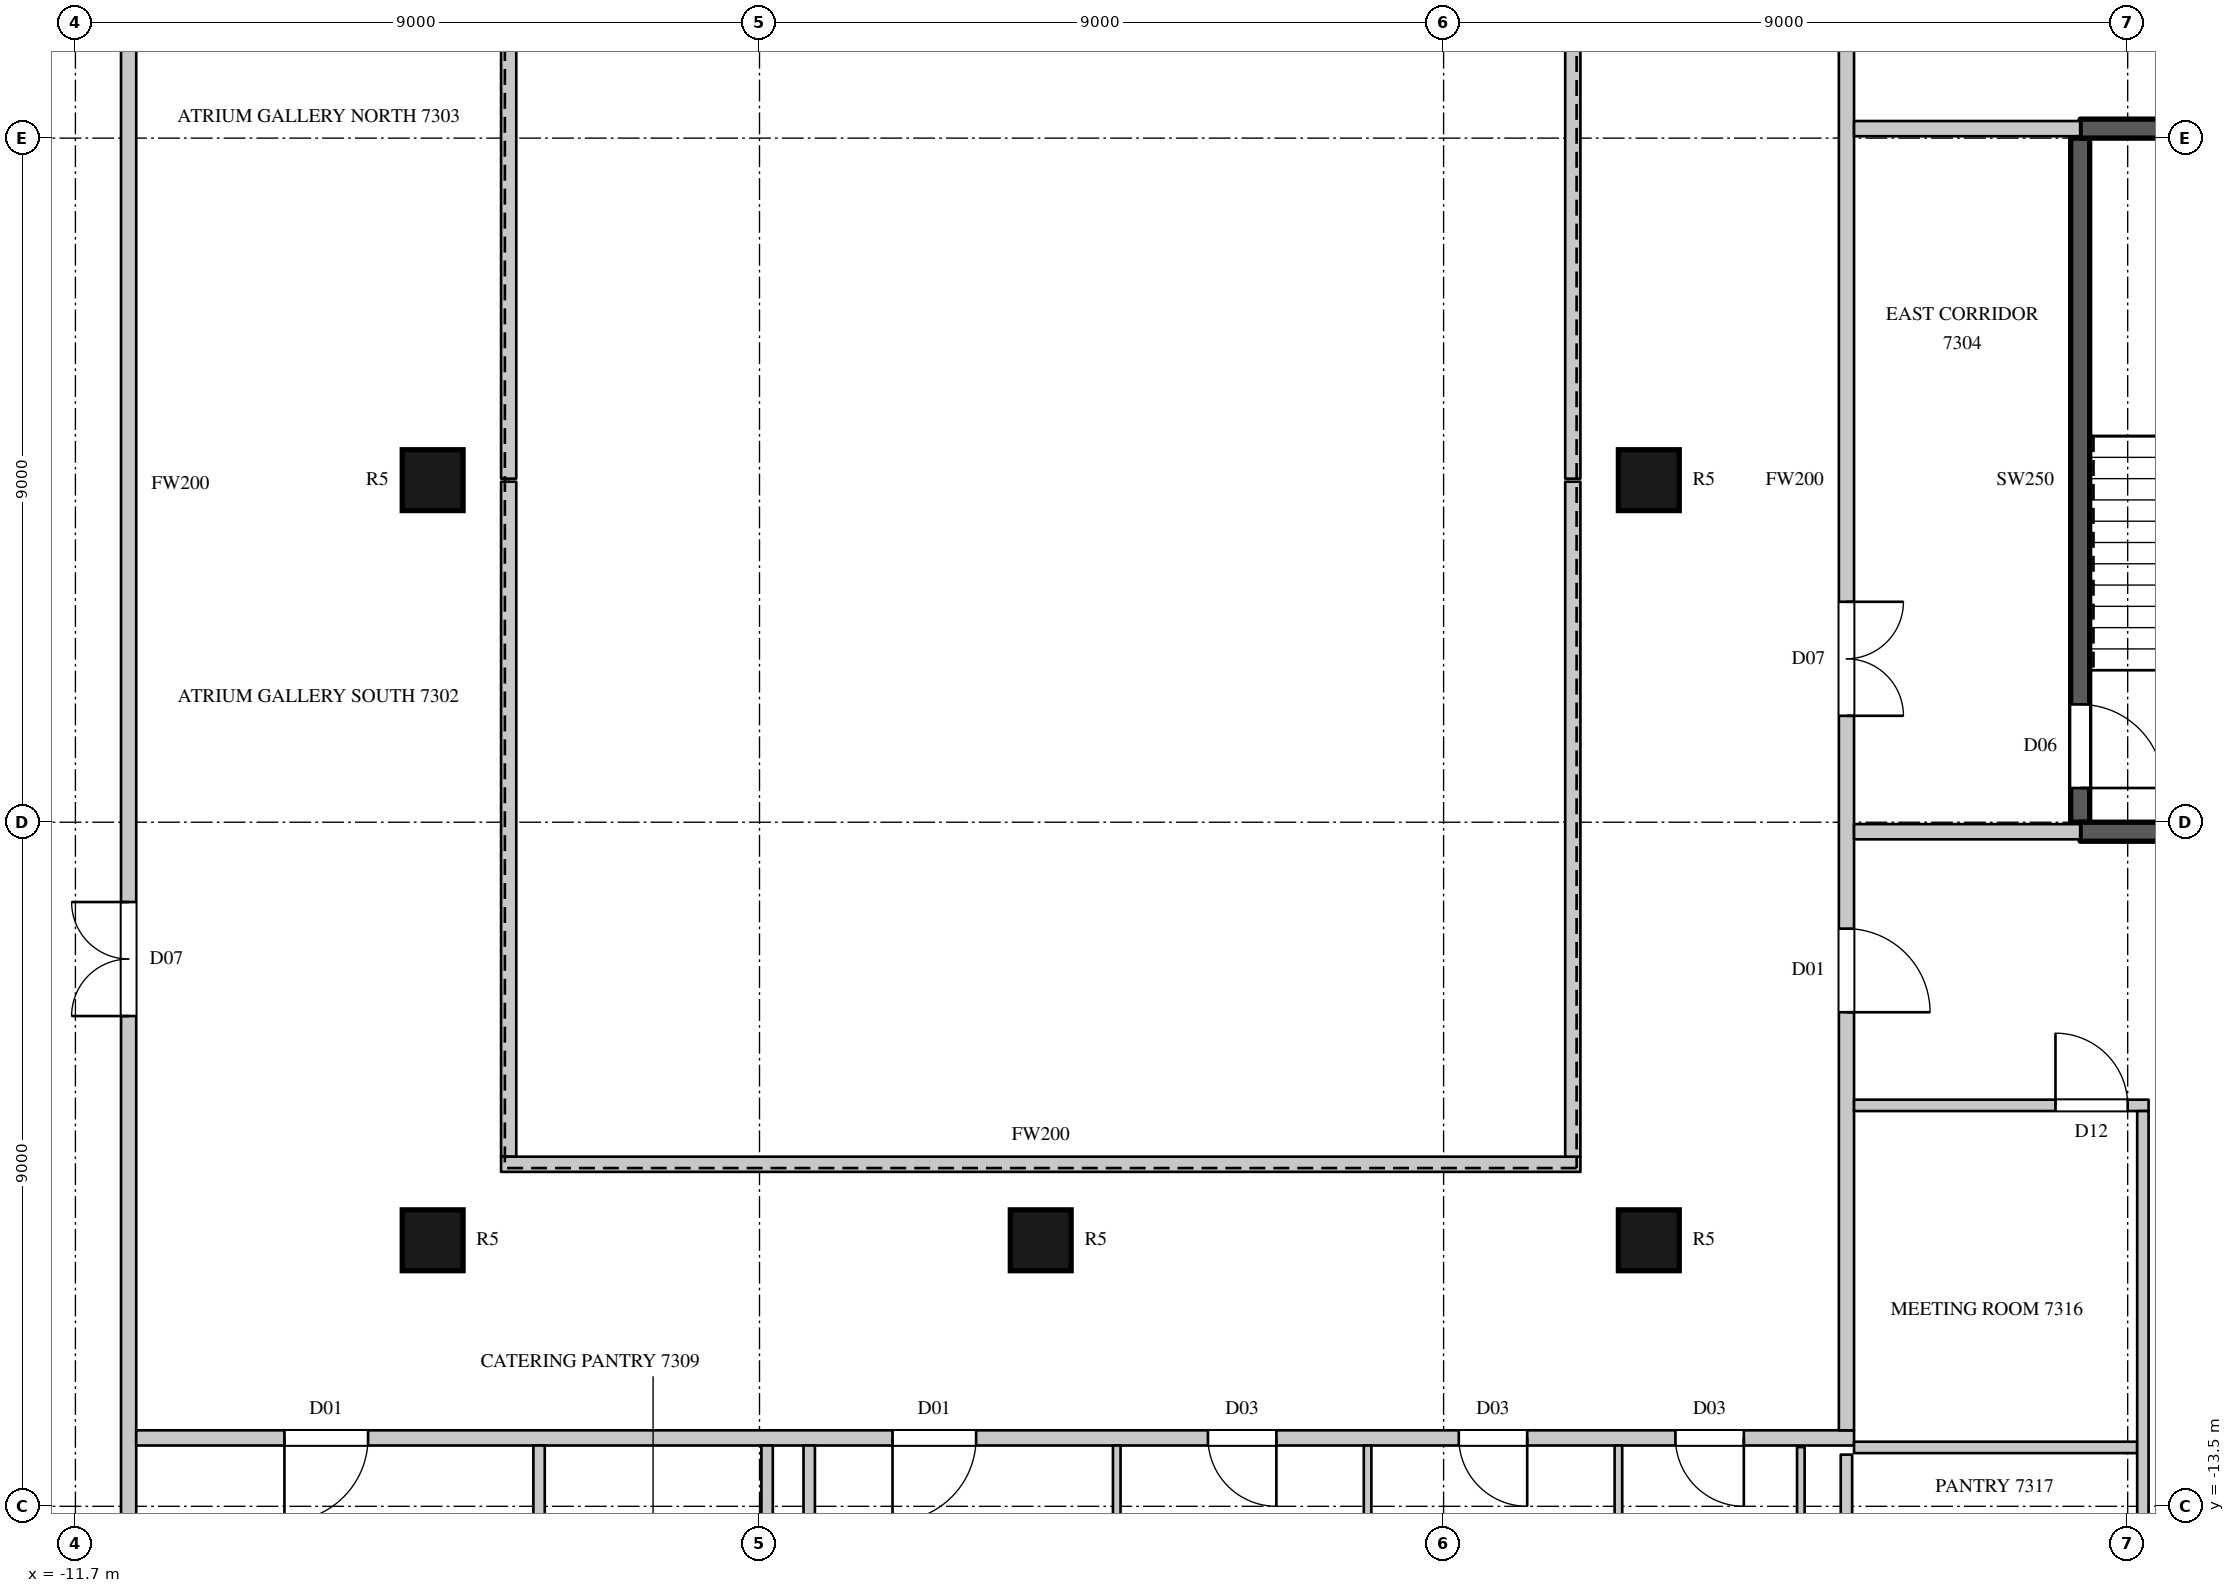
"""IFC4 building model, lengths in metres.
Left out: names, types, materials, properties, quantities, classifications, styles, units other than length and angle.
Written with IfcOpenShell. Run it as: python <this file> out.ifc"""

import sys

from ifc_helpers import new_model, si_unit, direction, frame, frame_2d, origin, origin_2d, place, context, subcontext, project, spatial, rectangle, circle, extrude, element, fill, save


model = new_model("IFC4")
c1 = context("Model", 3, precision=1e-05, world=origin(), true_north=direction((0.0, 1.0)))
c2 = subcontext(c1, "Body", "Model", "MODEL_VIEW")
j1 = project(units=[si_unit("LENGTHUNIT", "METRE"), si_unit("PLANEANGLEUNIT", "RADIAN")], contexts=[c1])
p1 = place(None, origin())
s1 = spatial("IfcSite", under=j1, at=p1, CompositionType="ELEMENT")
p2 = place(p1, origin())
s2 = spatial("IfcBuilding", under=s1, at=p2, CompositionType="ELEMENT")
p3 = place(p2, frame((0.0, 0.0, 321.3)))
s3 = spatial("IfcBuildingStorey", under=s2, at=p3, CompositionType="ELEMENT", Elevation=321.3)
for number, where, z_axis, x_axis in (
    (1, (-7.0, -10.0, 0.0), (0.0, 0.0, 1.0), (1.0, 0.0, 0.0)),
    (2, (-7.0, 0.0, 0.0), (0.0, 0.0, 1.0), (1.0, 0.0, 0.0)),
    (3, (1.0, -10.0, 0.0), (0.0, 0.0, 1.0), (1.0, 0.0, 0.0)),
    (4, (9.0, -10.0, 0.0), (0.0, 0.0, 1.0), (1.0, 0.0, 0.0)),
    (5, (9.0, 0.0, 0.0), (0.0, 0.0, 1.0), (1.0, 0.0, 0.0)),
):
    element("IfcColumn", number, at=place(p3, frame(where, z_axis=z_axis, x_axis=x_axis)), inside=s3, PredefinedType="COLUMN", context=c2, shape_type="SweptSolid", body=[
        extrude(circle(Radius=0.4, at=origin_2d()), origin(), (0.0, 0.0, 1.0), 4.1),
    ])
p4 = place(p3, frame((-11.0, -14.8, 0.0), z_axis=(0.0, 0.0, 1.0), x_axis=(0.0, 1.0, 0.0)))
e6 = element("IfcWall", 6, at=p4, inside=s3, PredefinedType="PARTITIONING", context=c2, shape_type="SweptSolid", body=[
    extrude(rectangle(XDim=29.5, YDim=0.2, at=frame_2d((14.75, 0.0))), origin(), (0.0, 0.0, 1.0), 3.8),
])
p5 = place(p4, frame((7.75, 0.0, 0.0)))
e7 = element("IfcOpeningElement", 7, at=p5, cuts=e6, PredefinedType="OPENING", context=c2, shape_type="SweptSolid", body=[
    extrude(rectangle(XDim=1.5, YDim=2.4, at=frame_2d((0.75, 1.2))), frame((0.0, 0.11, 0.0), z_axis=(0.0, -1.0, 0.0), x_axis=(1.0, 0.0, 0.0)), (0.0, 0.0, 1.0), 0.22),
])
p6 = place(p3, frame((-10.9, -12.6, 0.0), z_axis=(0.0, 0.0, 1.0), x_axis=(1.0, 0.0, 0.0)))
e8 = element("IfcWall", 8, at=p6, inside=s3, PredefinedType="PARTITIONING", context=c2, shape_type="SweptSolid", body=[
    extrude(rectangle(XDim=22.6, YDim=0.2, at=frame_2d((11.3, 0.0))), origin(), (0.0, 0.0, 1.0), 3.8),
])
p7 = place(p6, frame((14.1, 0.0, 0.0)))
e9 = element("IfcOpeningElement", 9, at=p7, cuts=e8, PredefinedType="OPENING", context=c2, shape_type="SweptSolid", body=[
    extrude(rectangle(XDim=0.9, YDim=2.2, at=frame_2d((0.45, 1.1))), frame((0.0, 0.11, 0.0), z_axis=(0.0, -1.0, 0.0), x_axis=(1.0, 0.0, 0.0)), (0.0, 0.0, 1.0), 0.22),
])
p8 = place(p6, frame((17.4, 0.0, 0.0)))
e10 = element("IfcOpeningElement", 10, at=p8, cuts=e8, PredefinedType="OPENING", context=c2, shape_type="SweptSolid", body=[
    extrude(rectangle(XDim=0.9, YDim=2.2, at=frame_2d((0.45, 1.1))), frame((0.0, 0.11, 0.0), z_axis=(0.0, -1.0, 0.0), x_axis=(1.0, 0.0, 0.0)), (0.0, 0.0, 1.0), 0.22),
])
p9 = place(p6, frame((20.25, 0.0, 0.0)))
e11 = element("IfcOpeningElement", 11, at=p9, cuts=e8, PredefinedType="OPENING", context=c2, shape_type="SweptSolid", body=[
    extrude(rectangle(XDim=0.9, YDim=2.2, at=frame_2d((0.45, 1.1))), frame((0.0, 0.11, 0.0), z_axis=(0.0, -1.0, 0.0), x_axis=(1.0, 0.0, 0.0)), (0.0, 0.0, 1.0), 0.22),
])
p10 = place(p6, frame((1.95, 0.0, 0.0)))
e12 = element("IfcOpeningElement", 12, at=p10, cuts=e8, PredefinedType="OPENING", context=c2, shape_type="SweptSolid", body=[
    extrude(rectangle(XDim=1.1, YDim=2.4, at=frame_2d((0.55, 1.2))), frame((0.0, 0.11, 0.0), z_axis=(0.0, -1.0, 0.0), x_axis=(1.0, 0.0, 0.0)), (0.0, 0.0, 1.0), 0.22),
])
p11 = place(p6, frame((9.95, 0.0, 0.0)))
e13 = element("IfcOpeningElement", 13, at=p11, cuts=e8, PredefinedType="OPENING", context=c2, shape_type="SweptSolid", body=[
    extrude(rectangle(XDim=1.1, YDim=2.4, at=frame_2d((0.55, 1.2))), frame((0.0, 0.11, 0.0), z_axis=(0.0, -1.0, 0.0), x_axis=(1.0, 0.0, 0.0)), (0.0, 0.0, 1.0), 0.22),
])
p12 = place(p3, frame((-6.0, -8.9, 0.0), z_axis=(0.0, 0.0, 1.0), x_axis=(0.0, 1.0, 0.0)))
e14 = element("IfcWall", 14, at=p12, inside=s3, PredefinedType="PARTITIONING", context=c2, shape_type="SweptSolid", body=[
    extrude(rectangle(XDim=8.88, YDim=0.2, at=frame_2d((4.44, 0.0))), origin(), (0.0, 0.0, 1.0), 3.8),
])
p13 = place(p3, frame((-6.1, -9.0, 0.0), z_axis=(0.0, 0.0, 1.0), x_axis=(1.0, 0.0, 0.0)))
e15 = element("IfcWall", 15, at=p13, inside=s3, PredefinedType="PARTITIONING", context=c2, shape_type="SweptSolid", body=[
    extrude(rectangle(XDim=14.2, YDim=0.2, at=frame_2d((7.1, 0.0))), origin(), (0.0, 0.0, 1.0), 3.8),
])
for number, where, z_axis, x_axis in (
    (16, (-6.0, 0.02, 0.0), (0.0, 0.0, 1.0), (0.0, 1.0, 0.0)),
    (17, (8.0, -8.9, 0.0), (0.0, 0.0, 1.0), (0.0, 1.0, 0.0)),
    (18, (8.0, 0.02, 0.0), (0.0, 0.0, 1.0), (0.0, 1.0, 0.0)),
):
    element("IfcWall", number, at=place(p3, frame(where, z_axis=z_axis, x_axis=x_axis)), inside=s3, PredefinedType="PARTITIONING", context=c2, shape_type="SweptSolid", body=[
        extrude(rectangle(XDim=8.88, YDim=0.2, at=frame_2d((4.44, 0.0))), origin(), (0.0, 0.0, 1.0), 3.8),
    ])
p14 = place(p3, frame((11.6, -12.5, 0.0), z_axis=(0.0, 0.0, 1.0), x_axis=(0.0, 1.0, 0.0)))
e19 = element("IfcWall", 19, at=p14, inside=s3, PredefinedType="PARTITIONING", context=c2, shape_type="SweptSolid", body=[
    extrude(rectangle(XDim=25.0, YDim=0.2, at=frame_2d((12.5, 0.0))), origin(), (0.0, 0.0, 1.0), 3.8),
])
p15 = place(p14, frame((9.4, 0.0, 0.0)))
e20 = element("IfcOpeningElement", 20, at=p15, cuts=e19, PredefinedType="OPENING", context=c2, shape_type="SweptSolid", body=[
    extrude(rectangle(XDim=1.5, YDim=2.4, at=frame_2d((0.75, 1.2))), frame((0.0, 0.11, 0.0), z_axis=(0.0, -1.0, 0.0), x_axis=(1.0, 0.0, 0.0)), (0.0, 0.0, 1.0), 0.22),
])
p16 = place(p14, frame((5.5, 0.0, 0.0)))
e21 = element("IfcOpeningElement", 21, at=p16, cuts=e19, PredefinedType="OPENING", context=c2, shape_type="SweptSolid", body=[
    extrude(rectangle(XDim=1.1, YDim=2.4, at=frame_2d((0.55, 1.2))), frame((0.0, 0.11, 0.0), z_axis=(0.0, -1.0, 0.0), x_axis=(1.0, 0.0, 0.0)), (0.0, 0.0, 1.0), 0.22),
])
for number, where, z_axis, x_axis in (
    (22, (11.7, -4.625, 0.0), (0.0, 0.0, 1.0), (1.0, 0.0, 0.0)),
    (23, (11.7, 4.625, 0.0), (0.0, 0.0, 1.0), (1.0, 0.0, 0.0)),
):
    element("IfcWall", number, at=place(p3, frame(where, z_axis=z_axis, x_axis=x_axis)), inside=s3, PredefinedType="PARTITIONING", context=c2, shape_type="SweptSolid", body=[
        extrude(rectangle(XDim=2.975, YDim=0.2, at=frame_2d((1.488, 0.0))), origin(), (0.0, 0.0, 1.0), 3.8),
    ])
p17 = place(p3, frame((-5.6, -16.725, 0.0), z_axis=(0.0, 0.0, 1.0), x_axis=(0.0, 1.0, 0.0)))
e24 = element("IfcWall", 24, at=p17, inside=s3, PredefinedType="PARTITIONING", context=c2, shape_type="SweptSolid", body=[
    extrude(rectangle(XDim=4.025, YDim=0.15, at=frame_2d((2.013, 0.0))), origin(), (0.0, 0.0, 1.0), 3.8),
])
p18 = place(p17, frame((1.55, 0.0, 0.0)))
e25 = element("IfcOpeningElement", 25, at=p18, cuts=e24, PredefinedType="OPENING", context=c2, shape_type="SweptSolid", body=[
    extrude(rectangle(XDim=0.95, YDim=2.2, at=frame_2d((0.475, 1.1))), frame((0.0, 0.085, 0.0), z_axis=(0.0, -1.0, 0.0), x_axis=(1.0, 0.0, 0.0)), (0.0, 0.0, 1.0), 0.17),
])
p19 = place(p3, frame((-2.6, -16.725, 0.0), z_axis=(0.0, 0.0, 1.0), x_axis=(0.0, 1.0, 0.0)))
e26 = element("IfcWall", 26, at=p19, inside=s3, PredefinedType="PARTITIONING", context=c2, shape_type="SweptSolid", body=[
    extrude(rectangle(XDim=4.025, YDim=0.15, at=frame_2d((2.013, 0.0))), origin(), (0.0, 0.0, 1.0), 3.8),
])
p20 = place(p3, frame((-2.046, -23.542, 0.0), z_axis=(0.0, 0.0, 1.0), x_axis=(0.0, 1.0, 0.0)))
e27 = element("IfcWall", 27, at=p20, inside=s3, PredefinedType="PARTITIONING", context=c2, shape_type="SweptSolid", body=[
    extrude(rectangle(XDim=10.842, YDim=0.15, at=frame_2d((5.421, 0.0))), origin(), (0.0, 0.0, 1.0), 3.8),
])
p21 = place(p3, frame((11.6, -15.425, 0.0), z_axis=(0.0, 0.0, 1.0), x_axis=(0.0, 1.0, 0.0)))
e28 = element("IfcWall", 28, at=p21, inside=s3, PredefinedType="PARTITIONING", context=c2, shape_type="SweptSolid", body=[
    extrude(rectangle(XDim=2.605, YDim=0.15, at=frame_2d((1.302, 0.0))), origin(), (0.0, 0.0, 1.0), 3.8),
])
p22 = place(p3, frame((11.7, -12.725, 0.0), z_axis=(0.0, 0.0, 1.0), x_axis=(1.0, 0.0, 0.0)))
e29 = element("IfcWall", 29, at=p22, inside=s3, PredefinedType="PARTITIONING", context=c2, shape_type="SweptSolid", body=[
    extrude(rectangle(XDim=3.725, YDim=0.15, at=frame_2d((1.863, 0.0))), origin(), (0.0, 0.0, 1.0), 3.8),
])
p23 = place(p3, frame((11.7, -8.225, 0.0), z_axis=(0.0, 0.0, 1.0), x_axis=(1.0, 0.0, 0.0)))
e30 = element("IfcWall", 30, at=p23, inside=s3, PredefinedType="PARTITIONING", context=c2, shape_type="SweptSolid", body=[
    extrude(rectangle(XDim=3.875, YDim=0.15, at=frame_2d((1.938, 0.0))), origin(), (0.0, 0.0, 1.0), 3.15),
])
p24 = place(p23, frame((2.65, 0.0, 0.0)))
e31 = element("IfcOpeningElement", 31, at=p24, cuts=e30, PredefinedType="OPENING", context=c2, shape_type="SweptSolid", body=[
    extrude(rectangle(XDim=0.95, YDim=2.2, at=frame_2d((0.475, 1.1))), frame((0.0, 0.085, 0.0), z_axis=(0.0, -1.0, 0.0), x_axis=(1.0, 0.0, 0.0)), (0.0, 0.0, 1.0), 0.17),
])
p25 = place(p3, frame((15.5, -15.35, 0.0), z_axis=(0.0, 0.0, 1.0), x_axis=(0.0, 1.0, 0.0)))
e32 = element("IfcWall", 32, at=p25, inside=s3, PredefinedType="PARTITIONING", context=c2, shape_type="SweptSolid", body=[
    extrude(rectangle(XDim=7.05, YDim=0.15, at=frame_2d((3.525, 0.0))), origin(), (0.0, 0.0, 1.0), 3.8),
])
p26 = place(p3, frame((14.675, -4.5, 0.0), z_axis=(0.0, 0.0, 1.0), x_axis=(0.0, 1.0, 0.0)))
e33 = element("IfcWall", 33, at=p26, inside=s3, PredefinedType="SHEAR", context=c2, shape_type="SweptSolid", body=[
    extrude(rectangle(XDim=9.0, YDim=0.25, at=frame_2d((4.5, 0.0))), origin(), (0.0, 0.0, 1.0), 3.8),
])
p27 = place(p26, frame((0.45, 0.0, 0.0)))
e34 = element("IfcOpeningElement", 34, at=p27, cuts=e33, PredefinedType="OPENING", context=c2, shape_type="SweptSolid", body=[
    extrude(rectangle(XDim=1.1, YDim=2.2, at=frame_2d((0.55, 1.1))), frame((0.0, 0.135, 0.0), z_axis=(0.0, -1.0, 0.0), x_axis=(1.0, 0.0, 0.0)), (0.0, 0.0, 1.0), 0.27),
])
for number, where, z_axis, x_axis in (
    (35, (14.675, -4.625, 0.0), (0.0, 0.0, 1.0), (1.0, 0.0, 0.0)),
    (36, (14.675, 4.625, 0.0), (0.0, 0.0, 1.0), (1.0, 0.0, 0.0)),
):
    element("IfcWall", number, at=place(p3, frame(where, z_axis=z_axis, x_axis=x_axis)), inside=s3, PredefinedType="SHEAR", context=c2, shape_type="SweptSolid", body=[
        extrude(rectangle(XDim=4.45, YDim=0.25, at=frame_2d((2.225, 0.0))), origin(), (0.0, 0.0, 1.0), 3.8),
    ])
p28 = place(p3, frame((2.0, -23.344, 0.0), z_axis=(0.0, 0.0, 1.0), x_axis=(0.0, 1.0, 0.0)))
e37 = element("IfcWall", 37, at=p28, inside=s3, PredefinedType="PARTITIONING", context=c2, shape_type="SweptSolid", body=[
    extrude(rectangle(XDim=10.644, YDim=0.1, at=frame_2d((5.322, 0.0))), origin(), (0.0, 0.0, 1.0), 3.8),
])
p29 = place(p3, frame((5.3, -22.25, 0.0), z_axis=(0.0, 0.0, 1.0), x_axis=(0.0, 1.0, 0.0)))
e38 = element("IfcWall", 38, at=p29, inside=s3, PredefinedType="PARTITIONING", context=c2, shape_type="SweptSolid", body=[
    extrude(rectangle(XDim=9.55, YDim=0.1, at=frame_2d((4.775, 0.0))), origin(), (0.0, 0.0, 1.0), 3.8),
])
p30 = place(p3, frame((8.6, -21.576, 0.0), z_axis=(0.0, 0.0, 1.0), x_axis=(0.0, 1.0, 0.0)))
e39 = element("IfcWall", 39, at=p30, inside=s3, PredefinedType="PARTITIONING", context=c2, shape_type="SweptSolid", body=[
    extrude(rectangle(XDim=8.876, YDim=0.1, at=frame_2d((4.438, 0.0))), origin(), (0.0, 0.0, 1.0), 3.8),
])
p31 = place(p3, frame((11.0, -20.721, 0.0), z_axis=(0.0, 0.0, 1.0), x_axis=(0.0, 1.0, 0.0)))
e40 = element("IfcWall", 40, at=p31, inside=s3, PredefinedType="PARTITIONING", context=c2, shape_type="SweptSolid", body=[
    extrude(rectangle(XDim=8.001, YDim=0.1, at=frame_2d((4.001, 0.0))), origin(), (0.0, 0.0, 1.0), 3.8),
])
p32 = place(p5, origin())
e41 = element("IfcDoor", 41, at=p32, inside=s3, OperationType="DOUBLE_DOOR_SINGLE_SWING", PredefinedType="DOOR", context=c2, shape_type="SweptSolid", body=[
    extrude(rectangle(XDim=1.5, YDim=2.4, at=frame_2d((0.75, 1.2))), frame((0.0, 0.025, 0.0), z_axis=(0.0, -1.0, 0.0), x_axis=(1.0, 0.0, 0.0)), (0.0, 0.0, 1.0), 0.05),
])
fill(e7, e41)
p33 = place(p15, origin())
e42 = element("IfcDoor", 42, at=p33, inside=s3, OperationType="DOUBLE_DOOR_SINGLE_SWING", PredefinedType="DOOR", context=c2, shape_type="SweptSolid", body=[
    extrude(rectangle(XDim=1.5, YDim=2.4, at=frame_2d((0.75, 1.2))), frame((0.0, 0.025, 0.0), z_axis=(0.0, -1.0, 0.0), x_axis=(1.0, 0.0, 0.0)), (0.0, 0.0, 1.0), 0.05),
])
fill(e20, e42)
p34 = place(p7, origin())
e43 = element("IfcDoor", 43, at=p34, inside=s3, OperationType="SINGLE_SWING_LEFT", PredefinedType="DOOR", context=c2, shape_type="SweptSolid", body=[
    extrude(rectangle(XDim=0.9, YDim=2.2, at=frame_2d((0.45, 1.1))), frame((0.0, 0.025, 0.0), z_axis=(0.0, -1.0, 0.0), x_axis=(1.0, 0.0, 0.0)), (0.0, 0.0, 1.0), 0.05),
])
fill(e9, e43)
p35 = place(p8, origin())
e44 = element("IfcDoor", 44, at=p35, inside=s3, OperationType="SINGLE_SWING_LEFT", PredefinedType="DOOR", context=c2, shape_type="SweptSolid", body=[
    extrude(rectangle(XDim=0.9, YDim=2.2, at=frame_2d((0.45, 1.1))), frame((0.0, 0.025, 0.0), z_axis=(0.0, -1.0, 0.0), x_axis=(1.0, 0.0, 0.0)), (0.0, 0.0, 1.0), 0.05),
])
fill(e10, e44)
p36 = place(p9, origin())
e45 = element("IfcDoor", 45, at=p36, inside=s3, OperationType="SINGLE_SWING_LEFT", PredefinedType="DOOR", context=c2, shape_type="SweptSolid", body=[
    extrude(rectangle(XDim=0.9, YDim=2.2, at=frame_2d((0.45, 1.1))), frame((0.0, 0.025, 0.0), z_axis=(0.0, -1.0, 0.0), x_axis=(1.0, 0.0, 0.0)), (0.0, 0.0, 1.0), 0.05),
])
fill(e11, e45)
p37 = place(p10, origin())
e46 = element("IfcDoor", 46, at=p37, inside=s3, OperationType="SINGLE_SWING_RIGHT", PredefinedType="DOOR", context=c2, shape_type="SweptSolid", body=[
    extrude(rectangle(XDim=1.1, YDim=2.4, at=frame_2d((0.55, 1.2))), frame((0.0, 0.025, 0.0), z_axis=(0.0, -1.0, 0.0), x_axis=(1.0, 0.0, 0.0)), (0.0, 0.0, 1.0), 0.05),
])
fill(e12, e46)
p38 = place(p11, origin())
e47 = element("IfcDoor", 47, at=p38, inside=s3, OperationType="SINGLE_SWING_RIGHT", PredefinedType="DOOR", context=c2, shape_type="SweptSolid", body=[
    extrude(rectangle(XDim=1.1, YDim=2.4, at=frame_2d((0.55, 1.2))), frame((0.0, 0.025, 0.0), z_axis=(0.0, -1.0, 0.0), x_axis=(1.0, 0.0, 0.0)), (0.0, 0.0, 1.0), 0.05),
])
fill(e13, e47)
p39 = place(p16, origin())
e48 = element("IfcDoor", 48, at=p39, inside=s3, OperationType="SINGLE_SWING_RIGHT", PredefinedType="DOOR", context=c2, shape_type="SweptSolid", body=[
    extrude(rectangle(XDim=1.1, YDim=2.4, at=frame_2d((0.55, 1.2))), frame((0.0, 0.025, 0.0), z_axis=(0.0, -1.0, 0.0), x_axis=(1.0, 0.0, 0.0)), (0.0, 0.0, 1.0), 0.05),
])
fill(e21, e48)
p40 = place(p24, origin())
e49 = element("IfcDoor", 49, at=p40, inside=s3, OperationType="SINGLE_SWING_LEFT", PredefinedType="DOOR", context=c2, shape_type="SweptSolid", body=[
    extrude(rectangle(XDim=0.95, YDim=2.2, at=frame_2d((0.475, 1.1))), frame((0.0, 0.025, 0.0), z_axis=(0.0, -1.0, 0.0), x_axis=(1.0, 0.0, 0.0)), (0.0, 0.0, 1.0), 0.05),
])
fill(e31, e49)
p41 = place(p27, origin())
e50 = element("IfcDoor", 50, at=p41, inside=s3, OperationType="SINGLE_SWING_RIGHT", PredefinedType="DOOR", context=c2, shape_type="SweptSolid", body=[
    extrude(rectangle(XDim=1.1, YDim=2.2, at=frame_2d((0.55, 1.1))), frame((0.0, 0.025, 0.0), z_axis=(0.0, -1.0, 0.0), x_axis=(1.0, 0.0, 0.0)), (0.0, 0.0, 1.0), 0.05),
])
fill(e34, e50)
save(model, sys.argv[1])
